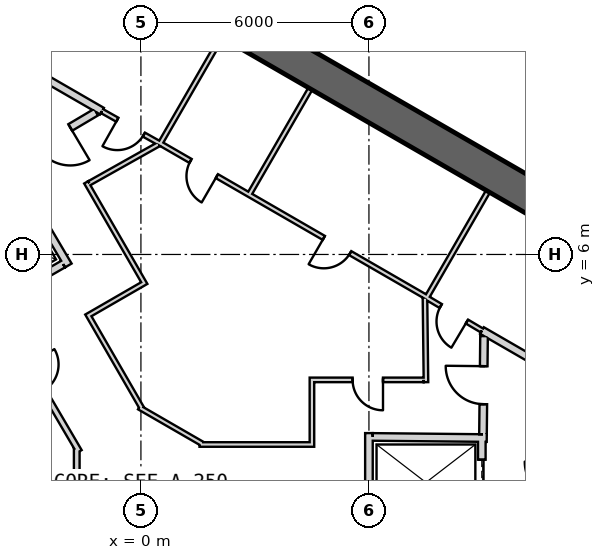
"""IFC4 building model, lengths in metres.
Left out: names, types, materials, properties, quantities, classifications, styles, units other than length and angle.
Written with IfcOpenShell. Run it as: python <this file> out.ifc"""

import sys

from ifc_helpers import new_model, si_unit, direction, frame, frame_2d, origin, place, context, subcontext, project, spatial, rectangle, extrude, element, fill, save


model = new_model("IFC4")
c1 = context("Model", 3, precision=1e-05, world=origin(), true_north=direction((0.0, 1.0)))
c2 = subcontext(c1, "Body", "Model", "MODEL_VIEW")
j1 = project(units=[si_unit("LENGTHUNIT", "METRE"), si_unit("PLANEANGLEUNIT", "RADIAN")], contexts=[c1])
p1 = place(None, origin())
s1 = spatial("IfcSite", under=j1, at=p1, CompositionType="ELEMENT")
p2 = place(p1, origin())
s2 = spatial("IfcBuilding", under=s1, at=p2, CompositionType="ELEMENT")
p3 = place(p2, frame((0.0, 0.0, 410.3)))
s3 = spatial("IfcBuildingStorey", under=s2, at=p3, CompositionType="ELEMENT", Elevation=410.3)
p4 = place(p3, frame((19.475, 2.208, 0.0), z_axis=(0.0, 0.0, 1.0), x_axis=(-0.866028369851, 0.499994862586, 0.0)))
e1 = element("IfcWall", 1, at=p4, inside=s3, PredefinedType="SHEAR", context=c2, shape_type="SweptSolid", body=[
    extrude(rectangle(XDim=31.523, YDim=0.9, at=frame_2d((15.762, 0.0))), origin(), (0.0, 0.0, 1.0), 5.0),
])
p5 = place(p4, frame((3.612, 0.0, 0.0)))
e2 = element("IfcOpeningElement", 2, at=p5, cuts=e1, PredefinedType="OPENING", context=c2, shape_type="SweptSolid", body=[
    extrude(rectangle(XDim=1.2, YDim=2.4, at=frame_2d((0.6, 1.2))), frame((0.0, 0.46, 0.0), z_axis=(0.0, -1.0, 0.0), x_axis=(1.0, 0.0, 0.0)), (0.0, 0.0, 1.0), 0.92),
])
p6 = place(p4, frame((26.712, 0.0, 0.0)))
e3 = element("IfcOpeningElement", 3, at=p6, cuts=e1, PredefinedType="OPENING", context=c2, shape_type="SweptSolid", body=[
    extrude(rectangle(XDim=1.2, YDim=2.4, at=frame_2d((0.6, 1.2))), frame((0.0, 0.46, 0.0), z_axis=(0.0, -1.0, 0.0), x_axis=(1.0, 0.0, 0.0)), (0.0, 0.0, 1.0), 0.92),
])
p7 = place(p3, frame((-1.922, 22.664, 0.04), z_axis=(0.0, 0.0, 1.0), x_axis=(0.902313179427, -0.431081113287, 0.0)))
e4 = element("IfcWall", 4, at=p7, inside=s3, PredefinedType="PARAPET", context=c2, shape_type="SweptSolid", body=[
    extrude(rectangle(XDim=26.031, YDim=0.5, at=frame_2d((13.016, 0.0))), origin(), (0.0, 0.0, 1.0), 0.6),
])
p8 = place(p3, frame((8.97, 1.2, 0.0), z_axis=(0.0, 0.0, 1.0), x_axis=(0.0, -1.0, 0.0)))
e5 = element("IfcWall", 5, at=p8, inside=s3, PredefinedType="PLUMBINGWALL", context=c2, shape_type="SweptSolid", body=[
    extrude(rectangle(XDim=2.4, YDim=0.2, at=frame_2d((1.2, 0.0))), origin(), (0.0, 0.0, 1.0), 4.75),
])
p9 = place(p8, frame((0.6, 0.0, 0.0)))
e6 = element("IfcOpeningElement", 6, at=p9, cuts=e5, PredefinedType="OPENING", context=c2, shape_type="SweptSolid", body=[
    extrude(rectangle(XDim=1.2, YDim=2.4, at=frame_2d((0.6, 1.2))), frame((0.0, 0.11, 0.0), z_axis=(0.0, -1.0, 0.0), x_axis=(1.0, 0.0, 0.0)), (0.0, 0.0, 1.0), 0.22),
])
p10 = place(p3, frame((6.0, -1.1, 0.0), z_axis=(0.0, 0.0, 1.0), x_axis=(0.0, 1.0, 0.0)))
e7 = element("IfcWall", 7, at=p10, inside=s3, PredefinedType="PLUMBINGWALL", context=c2, shape_type="SweptSolid", body=[
    extrude(rectangle(XDim=2.4, YDim=0.2, at=frame_2d((1.2, 0.0))), origin(), (0.0, 0.0, 1.0), 4.75),
])
p11 = place(p3, frame((9.1, 1.169, 0.0), z_axis=(0.0, 0.0, 1.0), x_axis=(-0.99994990606, 0.010009264196, 0.0)))
e8 = element("IfcWall", 8, at=p11, inside=s3, PredefinedType="PLUMBINGWALL", context=c2, shape_type="SweptSolid", body=[
    extrude(rectangle(XDim=3.0, YDim=0.2, at=frame_2d((1.5, 0.0))), origin(), (0.0, 0.0, 1.0), 4.75),
])
p12 = place(p3, frame((-2.047, 5.746, 0.0), z_axis=(0.0, 0.0, 1.0), x_axis=(-0.86605622881, -0.499946605688, 0.0)))
e9 = element("IfcWall", 9, at=p12, inside=s3, PredefinedType="PLUMBINGWALL", context=c2, shape_type="SweptSolid", body=[
    extrude(rectangle(XDim=2.2, YDim=0.2, at=frame_2d((1.1, 0.0))), origin(), (0.0, 0.0, 1.0), 4.75),
])
p13 = place(p3, frame((-3.538, 8.465, 0.0), z_axis=(0.0, 0.0, 1.0), x_axis=(0.508616218331, -0.860993346345, 0.0)))
e10 = element("IfcWall", 10, at=p13, inside=s3, PredefinedType="PLUMBINGWALL", context=c2, shape_type="SweptSolid", body=[
    extrude(rectangle(XDim=3.2, YDim=0.2, at=frame_2d((1.6, 0.0))), origin(), (0.0, 0.0, 1.0), 4.75),
])
p14 = place(p3, frame((9.133, 7.659, 0.0), z_axis=(0.0, 0.0, 1.0), x_axis=(-0.500017246033, -0.866015446554, 0.0)))
e11 = element("IfcWall", 11, at=p14, inside=s3, PredefinedType="PARTITIONING", context=c2, shape_type="SweptSolid", body=[
    extrude(rectangle(XDim=3.25, YDim=0.12, at=frame_2d((1.625, 0.0))), origin(), (0.0, 0.0, 1.0), 4.75),
])
p15 = place(p3, frame((-4.296, 11.66, 0.0), z_axis=(0.0, 0.0, 1.0), x_axis=(0.866027389382, -0.499996560828, 0.0)))
e12 = element("IfcWall", 12, at=p15, inside=s3, PredefinedType="PARTITIONING", context=c2, shape_type="SweptSolid", body=[
    extrude(rectangle(XDim=3.778, YDim=0.2, at=frame_2d((1.889, 0.0))), origin(), (0.0, 0.0, 1.0), 4.75),
])
p16 = place(p3, frame((8.974, 3.999, 0.0), z_axis=(0.0, 0.0, 1.0), x_axis=(0.86601284211, -0.500021756827, 0.0)))
e13 = element("IfcWall", 13, at=p16, inside=s3, PredefinedType="PARTITIONING", context=c2, shape_type="SweptSolid", body=[
    extrude(rectangle(XDim=3.577, YDim=0.2, at=frame_2d((1.789, 0.0))), origin(), (0.0, 0.0, 1.0), 4.75),
])
p17 = place(p3, frame((7.493, 4.878, 0.0), z_axis=(0.0, 0.0, 1.0), x_axis=(0.859934455514, -0.510404479035, 0.0)))
e14 = element("IfcWall", 14, at=p17, inside=s3, PredefinedType="PARTITIONING", context=c2, shape_type="SweptSolid", body=[
    extrude(rectangle(XDim=1.722, YDim=0.12, at=frame_2d((0.861, 0.0))), origin(), (0.0, 0.0, 1.0), 4.75),
])
p18 = place(p17, frame((0.461, 0.0, 0.0)))
e15 = element("IfcOpeningElement", 15, at=p18, cuts=e14, PredefinedType="OPENING", context=c2, shape_type="SweptSolid", body=[
    extrude(rectangle(XDim=0.8, YDim=2.1, at=frame_2d((0.4, 1.05))), frame((0.0, 0.07, 0.0), z_axis=(0.0, -1.0, 0.0), x_axis=(1.0, 0.0, 0.0)), (0.0, 0.0, 1.0), 0.14),
])
p19 = place(p3, frame((4.457, 10.359, 0.0), z_axis=(0.0, 0.0, 1.0), x_axis=(-0.500017246033, -0.866015446554, 0.0)))
e16 = element("IfcWall", 16, at=p19, inside=s3, PredefinedType="PARTITIONING", context=c2, shape_type="SweptSolid", body=[
    extrude(rectangle(XDim=3.25, YDim=0.12, at=frame_2d((1.625, 0.0))), origin(), (0.0, 0.0, 1.0), 4.75),
])
p20 = place(p3, frame((7.497, 4.886, 0.0), z_axis=(0.0, 0.0, 1.0), x_axis=(-0.866030989016, 0.499990325971, 0.0)))
e17 = element("IfcWall", 17, at=p20, inside=s3, PredefinedType="PARTITIONING", context=c2, shape_type="SweptSolid", body=[
    extrude(rectangle(XDim=8.1, YDim=0.12, at=frame_2d((4.05, 0.0))), origin(), (0.0, 0.0, 1.0), 4.75),
])
p21 = place(p20, frame((2.3, 0.0, 0.0)))
e18 = element("IfcOpeningElement", 18, at=p21, cuts=e17, PredefinedType="OPENING", context=c2, shape_type="SweptSolid", body=[
    extrude(rectangle(XDim=0.8, YDim=2.1, at=frame_2d((0.4, 1.05))), frame((0.0, 0.07, 0.0), z_axis=(0.0, -1.0, 0.0), x_axis=(1.0, 0.0, 0.0)), (0.0, 0.0, 1.0), 0.14),
])
p22 = place(p20, frame((6.35, 0.0, 0.0)))
e19 = element("IfcOpeningElement", 19, at=p22, cuts=e17, PredefinedType="OPENING", context=c2, shape_type="SweptSolid", body=[
    extrude(rectangle(XDim=0.8, YDim=2.1, at=frame_2d((0.4, 1.05))), frame((0.0, 0.07, 0.0), z_axis=(0.0, -1.0, 0.0), x_axis=(1.0, 0.0, 0.0)), (0.0, 0.0, 1.0), 0.14),
])
p23 = place(p3, frame((0.494, 8.895, 0.0), z_axis=(0.0, 0.0, 1.0), x_axis=(0.500017246033, 0.866015446554, 0.0)))
e20 = element("IfcWall", 20, at=p23, inside=s3, PredefinedType="PARTITIONING", context=c2, shape_type="SweptSolid", body=[
    extrude(rectangle(XDim=3.25, YDim=0.12, at=frame_2d((1.625, 0.0))), origin(), (0.0, 0.0, 1.0), 4.75),
])
p24 = place(p3, frame((-1.024, 9.772, 0.0), z_axis=(0.0, 0.0, 1.0), x_axis=(0.871968924608, -0.489561226527, 0.0)))
e21 = element("IfcWall", 21, at=p24, inside=s3, PredefinedType="PARTITIONING", context=c2, shape_type="SweptSolid", body=[
    extrude(rectangle(XDim=1.722, YDim=0.12, at=frame_2d((0.861, 0.0))), origin(), (0.0, 0.0, 1.0), 4.75),
])
p25 = place(p24, frame((0.461, 0.0, 0.0)))
e22 = element("IfcOpeningElement", 22, at=p25, cuts=e21, PredefinedType="OPENING", context=c2, shape_type="SweptSolid", body=[
    extrude(rectangle(XDim=0.8, YDim=2.1, at=frame_2d((0.4, 1.05))), frame((0.0, 0.07, 0.0), z_axis=(0.0, -1.0, 0.0), x_axis=(1.0, 0.0, 0.0)), (0.0, 0.0, 1.0), 0.14),
])
p26 = place(p3, frame((9.001, 1.27, 0.0), z_axis=(0.0, 0.0, 1.0), x_axis=(0.010780534828, 0.999941888346, 0.0)))
e23 = element("IfcWall", 23, at=p26, inside=s3, PredefinedType="PARTITIONING", context=c2, shape_type="SweptSolid", body=[
    extrude(rectangle(XDim=2.582, YDim=0.2, at=frame_2d((1.291, 0.0))), origin(), (0.0, 0.0, 1.0), 4.75),
])
p27 = place(p26, frame((0.791, 0.0, 0.0)))
e24 = element("IfcOpeningElement", 24, at=p27, cuts=e23, PredefinedType="OPENING", context=c2, shape_type="SweptSolid", body=[
    extrude(rectangle(XDim=1.0, YDim=2.1, at=frame_2d((0.5, 1.05))), frame((0.0, 0.11, 0.0), z_axis=(0.0, -1.0, 0.0), x_axis=(1.0, 0.0, 0.0)), (0.0, 0.0, 1.0), 0.22),
])
p28 = place(p3, frame((-1.179, 9.745, 0.0), z_axis=(0.0, 0.0, 1.0), x_axis=(-0.860630814782, -0.509229418482, 0.0)))
e25 = element("IfcWall", 25, at=p28, inside=s3, PredefinedType="PARTITIONING", context=c2, shape_type="SweptSolid", body=[
    extrude(rectangle(XDim=2.582, YDim=0.2, at=frame_2d((1.291, 0.0))), origin(), (0.0, 0.0, 1.0), 4.75),
])
p29 = place(p28, frame((0.791, 0.0, 0.0)))
e26 = element("IfcOpeningElement", 26, at=p29, cuts=e25, PredefinedType="OPENING", context=c2, shape_type="SweptSolid", body=[
    extrude(rectangle(XDim=1.0, YDim=2.1, at=frame_2d((0.5, 1.05))), frame((0.0, 0.11, 0.0), z_axis=(0.0, -1.0, 0.0), x_axis=(1.0, 0.0, 0.0)), (0.0, 0.0, 1.0), 0.22),
])
p30 = place(p3, frame((-1.624, 0.815, 0.0), z_axis=(0.0, 0.0, 1.0), x_axis=(-0.505868173579, 0.862610799237, 0.0)))
e27 = element("IfcWall", 27, at=p30, inside=s3, PredefinedType="PLUMBINGWALL", context=c2, shape_type="SweptSolid", body=[
    extrude(rectangle(XDim=4.383, YDim=0.15, at=frame_2d((2.191, 0.0))), origin(), (0.0, 0.0, 1.0), 4.75),
])
p31 = place(p30, frame((1.855, 0.0, 0.0)))
e28 = element("IfcOpeningElement", 28, at=p31, cuts=e27, PredefinedType="OPENING", context=c2, shape_type="SweptSolid", body=[
    extrude(rectangle(XDim=0.8, YDim=2.1, at=frame_2d((0.4, 1.05))), frame((0.0, 0.085, 0.0), z_axis=(0.0, -1.0, 0.0), x_axis=(1.0, 0.0, 0.0)), (0.0, 0.0, 1.0), 0.17),
])
p32 = place(p3, frame((-1.689, -1.053, 0.0), z_axis=(0.0, 0.0, 1.0), x_axis=(0.0, 1.0, 0.0)))
e29 = element("IfcWall", 29, at=p32, inside=s3, PredefinedType="PLUMBINGWALL", context=c2, shape_type="SweptSolid", body=[
    extrude(rectangle(XDim=1.954, YDim=0.15, at=frame_2d((0.977, 0.0))), origin(), (0.0, 0.0, 1.0), 4.75),
])
p33 = place(p3, frame((7.501, 2.64, 0.0), z_axis=(0.0, 0.0, 1.0), x_axis=(-0.01174194727, 0.999931060961, 0.0)))
e30 = element("IfcWall", 30, at=p33, inside=s3, PredefinedType="PARTITIONING", context=c2, shape_type="SweptSolid", body=[
    extrude(rectangle(XDim=2.225, YDim=0.12, at=frame_2d((1.112, 0.0))), origin(), (0.0, 0.0, 1.0), 4.75),
])
p34 = place(p3, frame((4.44, 2.7, 0.0), z_axis=(0.0, 0.0, 1.0), x_axis=(1.0, 0.0, 0.0)))
e31 = element("IfcWall", 31, at=p34, inside=s3, PredefinedType="PARTITIONING", context=c2, shape_type="SweptSolid", body=[
    extrude(rectangle(XDim=3.0, YDim=0.12, at=frame_2d((1.5, 0.0))), origin(), (0.0, 0.0, 1.0), 4.75),
])
p35 = place(p34, frame((1.13, 0.0, 0.0)))
e32 = element("IfcOpeningElement", 32, at=p35, cuts=e31, PredefinedType="OPENING", context=c2, shape_type="SweptSolid", body=[
    extrude(rectangle(XDim=0.8, YDim=2.1, at=frame_2d((0.4, 1.05))), frame((0.0, 0.07, 0.0), z_axis=(0.0, -1.0, 0.0), x_axis=(1.0, 0.0, 0.0)), (0.0, 0.0, 1.0), 0.14),
])
p36 = place(p3, frame((4.5, 0.94, 0.0), z_axis=(0.0, 0.0, 1.0), x_axis=(0.0, 1.0, 0.0)))
e33 = element("IfcWall", 33, at=p36, inside=s3, PredefinedType="PARTITIONING", context=c2, shape_type="SweptSolid", body=[
    extrude(rectangle(XDim=1.7, YDim=0.12, at=frame_2d((0.85, 0.0))), origin(), (0.0, 0.0, 1.0), 4.75),
])
p37 = place(p3, frame((1.542, 1.0, 0.0), z_axis=(0.0, 0.0, 1.0), x_axis=(1.0, 0.0, 0.0)))
e34 = element("IfcWall", 34, at=p37, inside=s3, PredefinedType="PARTITIONING", context=c2, shape_type="SweptSolid", body=[
    extrude(rectangle(XDim=2.898, YDim=0.12, at=frame_2d((1.449, 0.0))), origin(), (0.0, 0.0, 1.0), 4.75),
])
p38 = place(p3, frame((-0.047, 1.977, 0.0), z_axis=(0.0, 0.0, 1.0), x_axis=(0.865998615205, -0.500046396311, 0.0)))
e35 = element("IfcWall", 35, at=p38, inside=s3, PredefinedType="PARTITIONING", context=c2, shape_type="SweptSolid", body=[
    extrude(rectangle(XDim=1.935, YDim=0.12, at=frame_2d((0.968, 0.0))), origin(), (0.0, 0.0, 1.0), 4.75),
])
p39 = place(p3, frame((-1.414, 4.449, 0.0), z_axis=(0.0, 0.0, 1.0), x_axis=(0.500028961621, -0.866008682139, 0.0)))
e36 = element("IfcWall", 36, at=p39, inside=s3, PredefinedType="PARTITIONING", context=c2, shape_type="SweptSolid", body=[
    extrude(rectangle(XDim=2.896, YDim=0.12, at=frame_2d((1.448, 0.0))), origin(), (0.0, 0.0, 1.0), 4.75),
])
p40 = place(p3, frame((0.14, 5.277, 0.0), z_axis=(0.0, 0.0, 1.0), x_axis=(-0.865989465428, -0.500062241894, 0.0)))
e37 = element("IfcWall", 37, at=p40, inside=s3, PredefinedType="PARTITIONING", context=c2, shape_type="SweptSolid", body=[
    extrude(rectangle(XDim=1.7, YDim=0.12, at=frame_2d((0.85, 0.0))), origin(), (0.0, 0.0, 1.0), 4.75),
])
p41 = place(p3, frame((-1.442, 7.897, 0.0), z_axis=(0.0, 0.0, 1.0), x_axis=(0.499990139034, -0.866031096941, 0.0)))
e38 = element("IfcWall", 38, at=p41, inside=s3, PredefinedType="PARTITIONING", context=c2, shape_type="SweptSolid", body=[
    extrude(rectangle(XDim=3.0, YDim=0.12, at=frame_2d((1.5, 0.0))), origin(), (0.0, 0.0, 1.0), 4.75),
])
p42 = place(p3, frame((0.475, 8.905, 0.0), z_axis=(0.0, 0.0, 1.0), x_axis=(-0.871832572129, -0.489804007921, 0.0)))
e39 = element("IfcWall", 39, at=p42, inside=s3, PredefinedType="PARTITIONING", context=c2, shape_type="SweptSolid", body=[
    extrude(rectangle(XDim=2.104, YDim=0.12, at=frame_2d((1.052, 0.0))), origin(), (0.0, 0.0, 1.0), 4.75),
])
p43 = place(p27, origin())
e40 = element("IfcDoor", 40, at=p43, inside=s3, OperationType="SINGLE_SWING_RIGHT", PredefinedType="USERDEFINED", context=c2, shape_type="SweptSolid", body=[
    extrude(rectangle(XDim=1.0, YDim=2.1, at=frame_2d((0.5, 1.05))), frame((0.0, 0.025, 0.0), z_axis=(0.0, -1.0, 0.0), x_axis=(1.0, 0.0, 0.0)), (0.0, 0.0, 1.0), 0.05),
])
fill(e24, e40)
p44 = place(p9, origin())
e41 = element("IfcDoor", 41, at=p44, inside=s3, OperationType="SLIDING_TO_LEFT", PredefinedType="USERDEFINED", context=c2, shape_type="SweptSolid", body=[
    extrude(rectangle(XDim=1.2, YDim=2.4, at=frame_2d((0.6, 1.2))), frame((0.0, 0.025, 0.0), z_axis=(0.0, -1.0, 0.0), x_axis=(1.0, 0.0, 0.0)), (0.0, 0.0, 1.0), 0.05),
])
fill(e6, e41)
p45 = place(p29, origin())
e42 = element("IfcDoor", 42, at=p45, inside=s3, OperationType="SINGLE_SWING_LEFT", PredefinedType="USERDEFINED", context=c2, shape_type="SweptSolid", body=[
    extrude(rectangle(XDim=1.0, YDim=2.1, at=frame_2d((0.5, 1.05))), frame((0.0, 0.025, 0.0), z_axis=(0.0, -1.0, 0.0), x_axis=(1.0, 0.0, 0.0)), (0.0, 0.0, 1.0), 0.05),
])
fill(e26, e42)
p46 = place(p35, origin())
e43 = element("IfcDoor", 43, at=p46, inside=s3, OperationType="SINGLE_SWING_RIGHT", PredefinedType="USERDEFINED", context=c2, shape_type="SweptSolid", body=[
    extrude(rectangle(XDim=0.8, YDim=2.1, at=frame_2d((0.4, 1.05))), frame((0.0, 0.025, 0.0), z_axis=(0.0, -1.0, 0.0), x_axis=(1.0, 0.0, 0.0)), (0.0, 0.0, 1.0), 0.05),
])
fill(e32, e43)
p47 = place(p18, origin())
e44 = element("IfcDoor", 44, at=p47, inside=s3, OperationType="SINGLE_SWING_RIGHT", PredefinedType="USERDEFINED", context=c2, shape_type="SweptSolid", body=[
    extrude(rectangle(XDim=0.8, YDim=2.1, at=frame_2d((0.4, 1.05))), frame((0.0, 0.025, 0.0), z_axis=(0.0, -1.0, 0.0), x_axis=(1.0, 0.0, 0.0)), (0.0, 0.0, 1.0), 0.05),
])
fill(e15, e44)
p48 = place(p21, origin())
e45 = element("IfcDoor", 45, at=p48, inside=s3, OperationType="SINGLE_SWING_RIGHT", PredefinedType="USERDEFINED", context=c2, shape_type="SweptSolid", body=[
    extrude(rectangle(XDim=0.8, YDim=2.1, at=frame_2d((0.4, 1.05))), frame((0.0, 0.025, 0.0), z_axis=(0.0, -1.0, 0.0), x_axis=(1.0, 0.0, 0.0)), (0.0, 0.0, 1.0), 0.05),
])
fill(e18, e45)
p49 = place(p22, origin())
e46 = element("IfcDoor", 46, at=p49, inside=s3, OperationType="SINGLE_SWING_LEFT", PredefinedType="USERDEFINED", context=c2, shape_type="SweptSolid", body=[
    extrude(rectangle(XDim=0.8, YDim=2.1, at=frame_2d((0.4, 1.05))), frame((0.0, 0.025, 0.0), z_axis=(0.0, -1.0, 0.0), x_axis=(1.0, 0.0, 0.0)), (0.0, 0.0, 1.0), 0.05),
])
fill(e19, e46)
p50 = place(p25, origin())
e47 = element("IfcDoor", 47, at=p50, inside=s3, OperationType="SINGLE_SWING_LEFT", PredefinedType="USERDEFINED", context=c2, shape_type="SweptSolid", body=[
    extrude(rectangle(XDim=0.8, YDim=2.1, at=frame_2d((0.4, 1.05))), frame((0.0, 0.025, 0.0), z_axis=(0.0, -1.0, 0.0), x_axis=(1.0, 0.0, 0.0)), (0.0, 0.0, 1.0), 0.05),
])
fill(e22, e47)
save(model, sys.argv[1])
